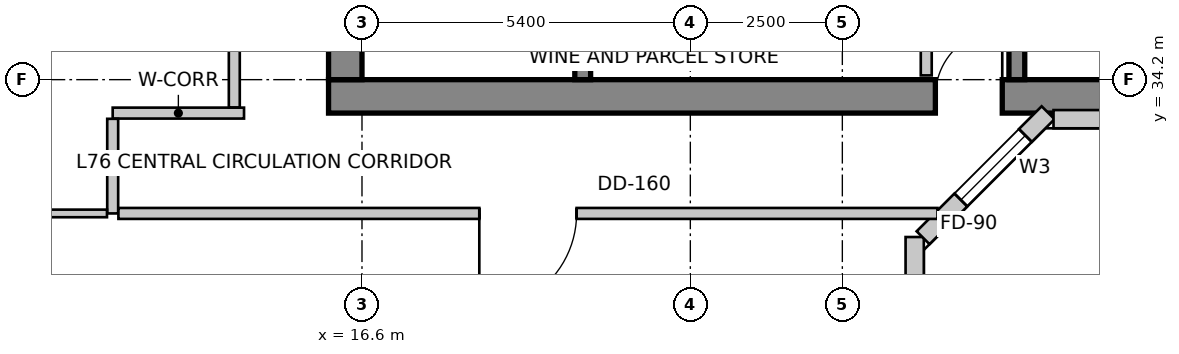
"""IFC4 building model, lengths in metres.
Left out: names, types, materials, properties, quantities, classifications, styles, units other than length and angle.
Written with IfcOpenShell. Run it as: python <this file> out.ifc"""

import sys

from ifc_helpers import new_model, si_unit, direction, frame, frame_2d, origin, place, context, subcontext, project, spatial, rectangle, extrude, source, transform, mapped, element, fill, save


model = new_model("IFC4")
c1 = context("Model", 3, precision=1e-05, world=origin(), true_north=direction((0.0, 1.0)))
c2 = subcontext(c1, "Body", "Model", "MODEL_VIEW")
j1 = project(units=[si_unit("LENGTHUNIT", "METRE"), si_unit("PLANEANGLEUNIT", "RADIAN")], contexts=[c1])
p1 = place(None, origin())
s1 = spatial("IfcSite", under=j1, at=p1, CompositionType="ELEMENT")
p2 = place(p1, origin())
s2 = spatial("IfcBuilding", under=s1, at=p2, CompositionType="ELEMENT")
p3 = place(p2, frame((0.0, 0.0, 296.5)))
s3 = spatial("IfcBuildingStorey", under=s2, at=p3, CompositionType="ELEMENT", Elevation=296.5)
p4 = place(p3, frame((16.05, 33.925, 0.0), z_axis=(0.0, 0.0, 1.0), x_axis=(1.0, 0.0, 0.0)))
e1 = element("IfcWall", 1, at=p4, inside=s3, PredefinedType="SHEAR", context=c2, shape_type="SweptSolid", body=[
    extrude(rectangle(XDim=15.5, YDim=0.55, at=frame_2d((7.75, 0.0))), origin(), (0.0, 0.0, 1.0), 4.0),
])
m1 = source(origin(), c2, "Body", "SweptSolid", [
    extrude(rectangle(XDim=1.1, YDim=2.15, at=frame_2d((0.55, 1.075))), frame((0.0, 0.285, 0.0), z_axis=(0.0, -1.0, 0.0), x_axis=(1.0, 0.0, 0.0)), (0.0, 0.0, 1.0), 0.57),
])
p5 = place(p4, frame((9.98, 0.0, 0.0)))
e2 = element("IfcOpeningElement", 2, at=p5, cuts=e1, PredefinedType="OPENING", context=c2, shape_type="MappedRepresentation", body=[
    mapped(m1, transform((0.0, 0.0, 0.0), scale=1.0)),
])
p6 = place(p3, frame((16.325, 34.2, 0.0), z_axis=(0.0, 0.0, 1.0), x_axis=(0.0, 1.0, 0.0)))
e3 = element("IfcWall", 3, at=p6, inside=s3, PredefinedType="SHEAR", context=c2, shape_type="SweptSolid", body=[
    extrude(rectangle(XDim=11.4, YDim=0.55, at=frame_2d((5.7, 0.0))), origin(), (0.0, 0.0, 1.0), 4.0),
])
p7 = place(p6, frame((7.15, 0.0, 0.0)))
e4 = element("IfcOpeningElement", 4, at=p7, cuts=e3, PredefinedType="OPENING", context=c2, shape_type="MappedRepresentation", body=[
    mapped(m1, transform((0.0, 0.0, 0.0), scale=1.0)),
])
p8 = place(p3, frame((20.23, 34.2, 0.0), z_axis=(0.0, 0.0, 1.0), x_axis=(0.0, 1.0, 0.0)))
e5 = element("IfcWall", 5, at=p8, inside=s3, PredefinedType="SHEAR", context=c2, shape_type="SweptSolid", body=[
    extrude(rectangle(XDim=9.06, YDim=0.26, at=frame_2d((4.53, 0.0))), origin(), (0.0, 0.0, 1.0), 4.0),
])
m2 = source(origin(), c2, "Body", "SweptSolid", [
    extrude(rectangle(XDim=1.1, YDim=2.15, at=frame_2d((0.55, 1.075))), frame((0.0, 0.14, 0.0), z_axis=(0.0, -1.0, 0.0), x_axis=(1.0, 0.0, 0.0)), (0.0, 0.0, 1.0), 0.28),
])
p9 = place(p8, frame((7.45, 0.0, 0.0)))
e6 = element("IfcOpeningElement", 6, at=p9, cuts=e5, PredefinedType="OPENING", context=c2, shape_type="MappedRepresentation", body=[
    mapped(m2, transform((0.0, 0.0, 0.0), scale=1.0)),
])
p10 = place(p3, frame((27.37, 34.2, 0.0), z_axis=(0.0, 0.0, 1.0), x_axis=(0.0, 1.0, 0.0)))
e7 = element("IfcWall", 7, at=p10, inside=s3, PredefinedType="SHEAR", context=c2, shape_type="SweptSolid", body=[
    extrude(rectangle(XDim=9.06, YDim=0.26, at=frame_2d((4.53, 0.0))), origin(), (0.0, 0.0, 1.0), 4.0),
])
p11 = place(p10, frame((7.45, 0.0, 0.0)))
e8 = element("IfcOpeningElement", 8, at=p11, cuts=e7, PredefinedType="OPENING", context=c2, shape_type="MappedRepresentation", body=[
    mapped(m2, transform((0.0, 0.0, 0.0), scale=1.0)),
])
p12 = place(p3, frame((25.69, 24.957, 0.0), z_axis=(0.0, 0.0, 1.0), x_axis=(0.0, 1.0, 0.0)))
e9 = element("IfcWall", 9, at=p12, inside=s3, PredefinedType="SOLIDWALL", context=c2, shape_type="SweptSolid", body=[
    extrude(rectangle(XDim=6.655, YDim=0.3, at=frame_2d((3.327, 0.0))), origin(), (0.0, 0.0, 1.0), 3.75),
])
m3 = source(origin(), c2, "Body", "SweptSolid", [
    extrude(rectangle(XDim=1.8, YDim=2.1, at=frame_2d((0.9, 1.05))), frame((0.0, 0.16, 0.0), z_axis=(0.0, -1.0, 0.0), x_axis=(1.0, 0.0, 0.0)), (0.0, 0.0, 1.0), 0.32),
])
p13 = place(p12, frame((0.454, 0.0, 0.85)))
e10 = element("IfcOpeningElement", 10, at=p13, cuts=e9, PredefinedType="OPENING", context=c2, shape_type="MappedRepresentation", body=[
    mapped(m3, transform((0.0, 0.0, 0.0), scale=1.0)),
])
m4 = source(origin(), c2, "Body", "SweptSolid", [
    extrude(rectangle(XDim=2.8, YDim=2.4, at=frame_2d((1.4, 1.2))), frame((0.0, 0.16, 0.0), z_axis=(0.0, -1.0, 0.0), x_axis=(1.0, 0.0, 0.0)), (0.0, 0.0, 1.0), 0.32),
])
p14 = place(p12, frame((3.181, 0.0, 0.85)))
e11 = element("IfcOpeningElement", 11, at=p14, cuts=e9, PredefinedType="OPENING", context=c2, shape_type="MappedRepresentation", body=[
    mapped(m4, transform((0.0, 0.0, 0.0), scale=1.0)),
])
p15 = place(p3, frame((25.828, 31.6, 0.0), z_axis=(0.0, 0.0, 1.0), x_axis=(0.707106781187, 0.707106781187, 0.0)))
e12 = element("IfcWall", 12, at=p15, inside=s3, PredefinedType="SOLIDWALL", context=c2, shape_type="SweptSolid", body=[
    extrude(rectangle(XDim=2.907, YDim=0.3, at=frame_2d((1.454, 0.0))), origin(), (0.0, 0.0, 1.0), 3.75),
])
m5 = source(origin(), c2, "Body", "SweptSolid", [
    extrude(rectangle(XDim=1.5, YDim=1.8, at=frame_2d((0.75, 0.9))), frame((0.0, 0.16, 0.0), z_axis=(0.0, -1.0, 0.0), x_axis=(1.0, 0.0, 0.0)), (0.0, 0.0, 1.0), 0.32),
])
p16 = place(p15, frame((0.879, 0.0, 0.85)))
e13 = element("IfcOpeningElement", 13, at=p16, cuts=e12, PredefinedType="OPENING", context=c2, shape_type="MappedRepresentation", body=[
    mapped(m5, transform((0.0, 0.0, 0.0), scale=1.0)),
])
p17 = place(p3, frame((27.973, 33.55, 0.0), z_axis=(0.0, 0.0, 1.0), x_axis=(1.0, 0.0, 0.0)))
e14 = element("IfcWall", 14, at=p17, inside=s3, PredefinedType="SOLIDWALL", context=c2, shape_type="SweptSolid", body=[
    extrude(rectangle(XDim=9.115, YDim=0.3, at=frame_2d((4.558, 0.0))), origin(), (0.0, 0.0, 1.0), 3.75),
])
p18 = place(p17, frame((1.039, 0.0, 0.85)))
e15 = element("IfcOpeningElement", 15, at=p18, cuts=e14, PredefinedType="OPENING", context=c2, shape_type="MappedRepresentation", body=[
    mapped(m4, transform((0.0, 0.0, 0.0), scale=1.0)),
])
m6 = source(origin(), c2, "Body", "SweptSolid", [
    extrude(rectangle(XDim=2.4, YDim=2.2, at=frame_2d((1.2, 1.1))), frame((0.0, 0.16, 0.0), z_axis=(0.0, -1.0, 0.0), x_axis=(1.0, 0.0, 0.0)), (0.0, 0.0, 1.0), 0.32),
])
p19 = place(p17, frame((5.476, 0.0, 0.85)))
e16 = element("IfcOpeningElement", 16, at=p19, cuts=e14, PredefinedType="OPENING", context=c2, shape_type="MappedRepresentation", body=[
    mapped(m6, transform((0.0, 0.0, 0.0), scale=1.0)),
])
p20 = place(p3, frame((25.88, 35.956, 0.0), z_axis=(0.0, 0.0, 1.0), x_axis=(0.0, -1.0, 0.0)))
e17 = element("IfcWall", 17, at=p20, inside=s3, PredefinedType="PARTITIONING", context=c2, shape_type="SweptSolid", body=[
    extrude(rectangle(XDim=1.686, YDim=0.18, at=frame_2d((0.843, 0.0))), origin(), (0.0, 0.0, 1.0), 3.042),
])
p21 = place(p3, frame((12.5, 33.65, 0.0), z_axis=(0.0, 0.0, 1.0), x_axis=(1.0, 0.0, 0.0)))
e18 = element("IfcWall", 18, at=p21, inside=s3, PredefinedType="PARTITIONING", context=c2, shape_type="SweptSolid", body=[
    extrude(rectangle(XDim=2.16, YDim=0.18, at=frame_2d((1.08, 0.0))), origin(), (0.0, 0.0, 1.0), 3.75),
])
p22 = place(p3, frame((12.5, 32.0, 0.0), z_axis=(0.0, 0.0, 1.0), x_axis=(0.0, 1.0, 0.0)))
e19 = element("IfcWall", 19, at=p22, inside=s3, PredefinedType="PARTITIONING", context=c2, shape_type="SweptSolid", body=[
    extrude(rectangle(XDim=1.556, YDim=0.18, at=frame_2d((0.778, 0.0))), origin(), (0.0, 0.0, 1.0), 3.419),
])
p23 = place(p3, frame((26.065, 32.0, 0.0), z_axis=(0.0, 0.0, 1.0), x_axis=(-1.0, 0.0, 0.0)))
e20 = element("IfcWall", 20, at=p23, inside=s3, PredefinedType="PARTITIONING", context=c2, shape_type="SweptSolid", body=[
    extrude(rectangle(XDim=13.471, YDim=0.18, at=frame_2d((6.736, 0.0))), origin(), (0.0, 0.0, 1.0), 3.419),
])
m7 = source(origin(), c2, "Body", "SweptSolid", [
    extrude(rectangle(XDim=1.6, YDim=2.15, at=frame_2d((0.8, 1.075))), frame((0.0, 0.1, 0.0), z_axis=(0.0, -1.0, 0.0), x_axis=(1.0, 0.0, 0.0)), (0.0, 0.0, 1.0), 0.2),
])
p24 = place(p23, frame((5.936, 0.0, 0.0)))
e21 = element("IfcOpeningElement", 21, at=p24, cuts=e20, PredefinedType="OPENING", context=c2, shape_type="MappedRepresentation", body=[
    mapped(m7, transform((0.0, 0.0, 0.0), scale=1.0)),
])
p25 = place(p3, frame((14.5, 33.744, 0.0), z_axis=(0.0, 0.0, 1.0), x_axis=(0.0, 1.0, 0.0)))
e22 = element("IfcWall", 22, at=p25, inside=s3, PredefinedType="PARTITIONING", context=c2, shape_type="SweptSolid", body=[
    extrude(rectangle(XDim=12.406, YDim=0.18, at=frame_2d((6.203, 0.0))), origin(), (0.0, 0.0, 1.0), 3.75),
])
m8 = source(origin(), c2, "Body", "SweptSolid", [
    extrude(rectangle(XDim=0.9, YDim=2.15, at=frame_2d((0.45, 1.075))), frame((0.0, 0.1, 0.0), z_axis=(0.0, -1.0, 0.0), x_axis=(1.0, 0.0, 0.0)), (0.0, 0.0, 1.0), 0.2),
])
p26 = place(p25, frame((4.37, 0.0, 0.0)))
e23 = element("IfcOpeningElement", 23, at=p26, cuts=e22, PredefinedType="OPENING", context=c2, shape_type="MappedRepresentation", body=[
    mapped(m8, transform((0.0, 0.0, 0.0), scale=1.0)),
])
p27 = place(p3, frame((12.406, 32.0, 0.0), z_axis=(0.0, 0.0, 1.0), x_axis=(-1.0, 0.0, 0.0)))
e24 = element("IfcWall", 24, at=p27, inside=s3, PredefinedType="PARTITIONING", context=c2, shape_type="SweptSolid", body=[
    extrude(rectangle(XDim=4.126, YDim=0.125, at=frame_2d((2.063, 0.0))), origin(), (0.0, 0.0, 1.0), 3.042),
])
m9 = source(origin(), c2, "Body", "SweptSolid", [
    extrude(rectangle(XDim=1.5, YDim=1.8, at=frame_2d((0.75, 0.9))), frame((0.0, -0.015, 0.0), z_axis=(0.0, -1.0, 0.0), x_axis=(1.0, 0.0, 0.0)), (0.0, 0.0, 1.0), 0.06),
])
p28 = place(p16, origin())
e25 = element("IfcWindow", 25, at=p28, inside=s3, PartitioningType="SINGLE_PANEL", PredefinedType="WINDOW", context=c2, shape_type="MappedRepresentation", body=[
    mapped(m9, transform((0.0, 0.0, 0.0), scale=1.0)),
])
fill(e13, e25)
m10 = source(origin(), c2, "Body", "SweptSolid", [
    extrude(rectangle(XDim=1.1, YDim=2.15, at=frame_2d((0.55, 1.075))), frame((0.0, 0.025, 0.0), z_axis=(0.0, -1.0, 0.0), x_axis=(1.0, 0.0, 0.0)), (0.0, 0.0, 1.0), 0.05),
])
p29 = place(p5, origin())
e26 = element("IfcDoor", 26, at=p29, inside=s3, OperationType="SINGLE_SWING_RIGHT", PredefinedType="DOOR", context=c2, shape_type="MappedRepresentation", body=[
    mapped(m10, transform((0.0, 0.0, 0.0), scale=1.0)),
])
fill(e2, e26)
m11 = source(origin(), c2, "Body", "SweptSolid", [
    extrude(rectangle(XDim=1.6, YDim=2.15, at=frame_2d((0.8, 1.075))), frame((0.0, 0.025, 0.0), z_axis=(0.0, -1.0, 0.0), x_axis=(1.0, 0.0, 0.0)), (0.0, 0.0, 1.0), 0.05),
])
p30 = place(p24, origin())
e27 = element("IfcDoor", 27, at=p30, inside=s3, OperationType="SINGLE_SWING_RIGHT", PredefinedType="DOOR", context=c2, shape_type="MappedRepresentation", body=[
    mapped(m11, transform((0.0, 0.0, 0.0), scale=1.0)),
])
fill(e21, e27)
save(model, sys.argv[1])
